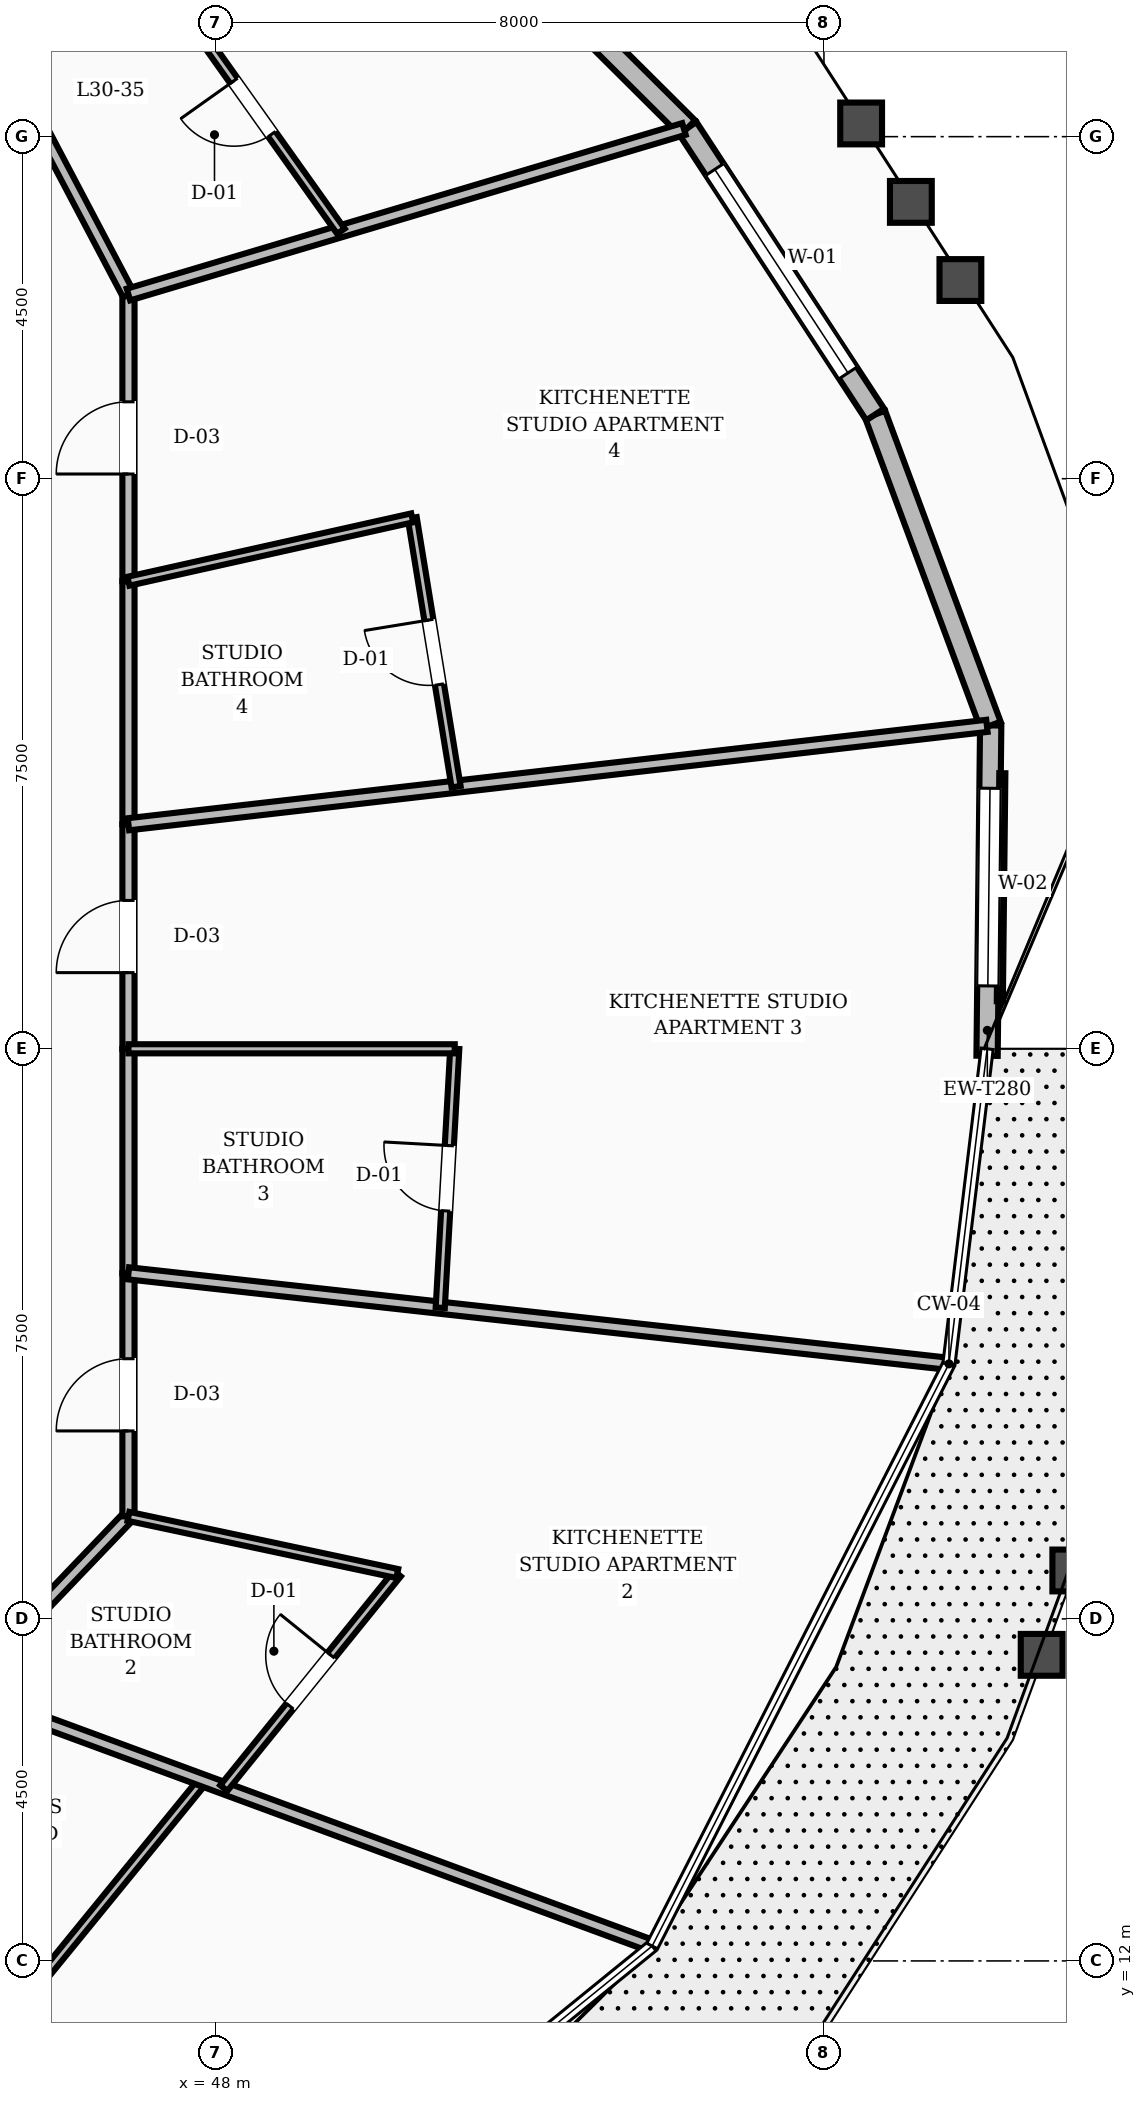
"""IFC4 building model, lengths in metres.
Left out: names, types, materials, properties, quantities, classifications, styles, units other than length and angle.
Written with IfcOpenShell. Run it as: python <this file> out.ifc"""

import sys

from ifc_helpers import new_model, si_unit, direction, frame, frame_2d, origin, place, context, subcontext, project, spatial, rectangle, extrude, element, fill, save


model = new_model("IFC4")
c1 = context("Model", 3, precision=1e-05, world=origin(), true_north=direction((0.0, 1.0)))
c2 = subcontext(c1, "Body", "Model", "MODEL_VIEW")
j1 = project(units=[si_unit("LENGTHUNIT", "METRE"), si_unit("PLANEANGLEUNIT", "RADIAN")], contexts=[c1])
p1 = place(None, origin())
s1 = spatial("IfcSite", under=j1, at=p1, CompositionType="ELEMENT")
p2 = place(p1, origin())
s2 = spatial("IfcBuilding", under=s1, at=p2, CompositionType="ELEMENT")
p3 = place(p2, frame((0.0, 0.0, 120.8)))
s3 = spatial("IfcBuildingStorey", under=s2, at=p3, CompositionType="ELEMENT", Elevation=120.8)
p4 = place(p3, frame((58.146, 23.908, 0.0), z_axis=(0.0, 0.0, 1.0), x_axis=(0.011008713298, 0.99993940228, 0.0)))
e1 = element("IfcWall", 1, at=p4, inside=s3, PredefinedType="STANDARD", context=c2, shape_type="SweptSolid", body=[
    extrude(rectangle(XDim=4.347, YDim=0.28, at=frame_2d((2.173, 0.0))), origin(), (0.0, 0.0, 1.0), 2.82),
])
p5 = place(p4, frame((0.919, 0.0, 0.8)))
e2 = element("IfcOpeningElement", 2, at=p5, cuts=e1, PredefinedType="OPENING", context=c2, shape_type="SweptSolid", body=[
    extrude(rectangle(XDim=2.6, YDim=1.65, at=frame_2d((1.3, 0.825))), frame((0.0, 0.15, 0.0), z_axis=(0.0, -1.0, 0.0), x_axis=(1.0, 0.0, 0.0)), (0.0, 0.0, 1.0), 0.3),
])
p6 = place(p3, frame((58.194, 28.254, 0.0), z_axis=(0.0, 0.0, 1.0), x_axis=(-0.348252546088, 0.937400748956, 0.0)))
e3 = element("IfcWall", 3, at=p6, inside=s3, PredefinedType="STANDARD", context=c2, shape_type="SweptSolid", body=[
    extrude(rectangle(XDim=4.364, YDim=0.28, at=frame_2d((2.182, 0.0))), origin(), (0.0, 0.0, 1.0), 2.82),
])
p7 = place(p3, frame((56.674, 32.345, 0.0), z_axis=(0.0, 0.0, 1.0), x_axis=(-0.547716413999, 0.836664048371, 0.0)))
e4 = element("IfcWall", 4, at=p7, inside=s3, PredefinedType="STANDARD", context=c2, shape_type="SweptSolid", body=[
    extrude(rectangle(XDim=4.506, YDim=0.28, at=frame_2d((2.253, 0.0))), origin(), (0.0, 0.0, 1.0), 2.82),
])
p8 = place(p7, frame((0.653, 0.0, 0.8)))
e5 = element("IfcOpeningElement", 5, at=p8, cuts=e4, PredefinedType="OPENING", context=c2, shape_type="SweptSolid", body=[
    extrude(rectangle(XDim=3.2, YDim=1.65, at=frame_2d((1.6, 0.825))), frame((0.0, 0.15, 0.0), z_axis=(0.0, -1.0, 0.0), x_axis=(1.0, 0.0, 0.0)), (0.0, 0.0, 1.0), 0.3),
])
p9 = place(p3, frame((54.206, 36.115, 0.0), z_axis=(0.0, 0.0, 1.0), x_axis=(-0.708876231206, 0.705332892208, 0.0)))
e6 = element("IfcWall", 6, at=p9, inside=s3, PredefinedType="STANDARD", context=c2, shape_type="SweptSolid", body=[
    extrude(rectangle(XDim=4.685, YDim=0.28, at=frame_2d((2.343, 0.0))), origin(), (0.0, 0.0, 1.0), 2.82),
])
p10 = place(p3, frame((46.85, 24.0, 0.0), z_axis=(0.0, 0.0, 1.0), x_axis=(0.0, 1.0, 0.0)))
e7 = element("IfcWall", 7, at=p10, inside=s3, PredefinedType="SOLIDWALL", context=c2, shape_type="SweptSolid", body=[
    extrude(rectangle(XDim=2.954, YDim=0.16, at=frame_2d((1.477, 0.0))), origin(), (0.0, 0.0, 1.0), 2.8),
])
p11 = place(p10, frame((1.002, 0.0, 0.0)))
e8 = element("IfcOpeningElement", 8, at=p11, cuts=e7, PredefinedType="OPENING", context=c2, shape_type="SweptSolid", body=[
    extrude(rectangle(XDim=0.95, YDim=2.1, at=frame_2d((0.475, 1.05))), frame((0.0, 0.09, 0.0), z_axis=(0.0, -1.0, 0.0), x_axis=(1.0, 0.0, 0.0)), (0.0, 0.0, 1.0), 0.18),
])
p12 = place(p3, frame((46.85, 26.954, 0.0), z_axis=(0.0, 0.0, 1.0), x_axis=(0.0, 1.0, 0.0)))
e9 = element("IfcWall", 9, at=p12, inside=s3, PredefinedType="SOLIDWALL", context=c2, shape_type="SweptSolid", body=[
    extrude(rectangle(XDim=3.197, YDim=0.16, at=frame_2d((1.599, 0.0))), origin(), (0.0, 0.0, 1.0), 2.8),
])
p13 = place(p3, frame((46.85, 30.151, 0.0), z_axis=(0.0, 0.0, 1.0), x_axis=(0.0, 1.0, 0.0)))
e10 = element("IfcWall", 10, at=p13, inside=s3, PredefinedType="SOLIDWALL", context=c2, shape_type="SweptSolid", body=[
    extrude(rectangle(XDim=3.771, YDim=0.16, at=frame_2d((1.886, 0.0))), origin(), (0.0, 0.0, 1.0), 2.8),
])
p14 = place(p13, frame((1.411, 0.0, 0.0)))
e11 = element("IfcOpeningElement", 11, at=p14, cuts=e10, PredefinedType="OPENING", context=c2, shape_type="SweptSolid", body=[
    extrude(rectangle(XDim=0.95, YDim=2.1, at=frame_2d((0.475, 1.05))), frame((0.0, 0.09, 0.0), z_axis=(0.0, -1.0, 0.0), x_axis=(1.0, 0.0, 0.0)), (0.0, 0.0, 1.0), 0.18),
])
p15 = place(p3, frame((46.85, 33.923, 0.0), z_axis=(0.0, 0.0, 1.0), x_axis=(-0.466093963429, 0.884735224378, 0.0)))
e12 = element("IfcWall", 12, at=p15, inside=s3, PredefinedType="SOLIDWALL", context=c2, shape_type="SweptSolid", body=[
    extrude(rectangle(XDim=3.648, YDim=0.16, at=frame_2d((1.824, 0.0))), origin(), (0.0, 0.0, 1.0), 2.8),
])
p16 = place(p3, frame((44.65, 15.548, 0.0), z_axis=(0.0, 0.0, 1.0), x_axis=(0.691055487108, 0.722801711216, 0.0)))
e13 = element("IfcWall", 13, at=p16, inside=s3, PredefinedType="SOLIDWALL", context=c2, shape_type="SweptSolid", body=[
    extrude(rectangle(XDim=3.184, YDim=0.16, at=frame_2d((1.592, 0.0))), origin(), (0.0, 0.0, 1.0), 2.8),
])
p17 = place(p3, frame((46.85, 17.849, 0.0), z_axis=(0.0, 0.0, 1.0), x_axis=(0.0, 1.0, 0.0)))
e14 = element("IfcWall", 14, at=p17, inside=s3, PredefinedType="SOLIDWALL", context=c2, shape_type="SweptSolid", body=[
    extrude(rectangle(XDim=3.197, YDim=0.16, at=frame_2d((1.599, 0.0))), origin(), (0.0, 0.0, 1.0), 2.8),
])
p18 = place(p17, frame((1.124, 0.0, 0.0)))
e15 = element("IfcOpeningElement", 15, at=p18, cuts=e14, PredefinedType="OPENING", context=c2, shape_type="SweptSolid", body=[
    extrude(rectangle(XDim=0.95, YDim=2.1, at=frame_2d((0.475, 1.05))), frame((0.0, 0.09, 0.0), z_axis=(0.0, -1.0, 0.0), x_axis=(1.0, 0.0, 0.0)), (0.0, 0.0, 1.0), 0.18),
])
p19 = place(p3, frame((46.85, 21.046, 0.0), z_axis=(0.0, 0.0, 1.0), x_axis=(0.0, 1.0, 0.0)))
e16 = element("IfcWall", 16, at=p19, inside=s3, PredefinedType="SOLIDWALL", context=c2, shape_type="SweptSolid", body=[
    extrude(rectangle(XDim=2.954, YDim=0.16, at=frame_2d((1.477, 0.0))), origin(), (0.0, 0.0, 1.0), 2.8),
])
p20 = place(p3, frame((45.588, 11.624, 0.0), z_axis=(0.0, 0.0, 1.0), x_axis=(0.632049552825, 0.774927972636, 0.0)))
e17 = element("IfcWall", 17, at=p20, inside=s3, PredefinedType="PARTITIONING", context=c2, shape_type="SweptSolid", body=[
    extrude(rectangle(XDim=3.549, YDim=0.12, at=frame_2d((1.774, 0.0))), origin(), (0.0, 0.0, 1.0), 2.8),
])
p21 = place(p3, frame((44.65, 15.548, 0.0), z_axis=(0.0, 0.0, 1.0), x_axis=(0.938256165997, -0.345941276764, 0.0)))
e18 = element("IfcWall", 18, at=p21, inside=s3, PredefinedType="SOLIDWALL", context=c2, shape_type="SweptSolid", body=[
    extrude(rectangle(XDim=9.639, YDim=0.16, at=frame_2d((4.819, 0.0))), origin(), (0.0, 0.0, 1.0), 2.8),
])
p22 = place(p3, frame((48.104, 14.274, 0.0), z_axis=(0.0, 0.0, 1.0), x_axis=(0.628681475745, 0.777662910299, 0.0)))
e19 = element("IfcWall", 19, at=p22, inside=s3, PredefinedType="PARTITIONING", context=c2, shape_type="SweptSolid", body=[
    extrude(rectangle(XDim=3.63, YDim=0.12, at=frame_2d((1.815, 0.0))), origin(), (0.0, 0.0, 1.0), 2.8),
])
p23 = place(p22, frame((1.385, 0.0, 0.0)))
e20 = element("IfcOpeningElement", 20, at=p23, cuts=e19, PredefinedType="OPENING", context=c2, shape_type="SweptSolid", body=[
    extrude(rectangle(XDim=0.86, YDim=2.1, at=frame_2d((0.43, 1.05))), frame((0.0, 0.07, 0.0), z_axis=(0.0, -1.0, 0.0), x_axis=(1.0, 0.0, 0.0)), (0.0, 0.0, 1.0), 0.14),
])
p24 = place(p3, frame((46.85, 17.849, 0.0), z_axis=(0.0, 0.0, 1.0), x_axis=(0.978118502474, -0.208048540292, 0.0)))
e21 = element("IfcWall", 21, at=p24, inside=s3, PredefinedType="PARTITIONING", context=c2, shape_type="SweptSolid", body=[
    extrude(rectangle(XDim=3.615, YDim=0.12, at=frame_2d((1.808, 0.0))), origin(), (0.0, 0.0, 1.0), 2.8),
])
p25 = place(p3, frame((46.85, 21.046, 0.0), z_axis=(0.0, 0.0, 1.0), x_axis=(0.993965535476, -0.109692817837, 0.0)))
e22 = element("IfcWall", 22, at=p25, inside=s3, PredefinedType="SOLIDWALL", context=c2, shape_type="SweptSolid", body=[
    extrude(rectangle(XDim=10.81, YDim=0.16, at=frame_2d((5.405, 0.0))), origin(), (0.0, 0.0, 1.0), 2.8),
])
p26 = place(p3, frame((50.952, 20.594, 0.0), z_axis=(0.0, 0.0, 1.0), x_axis=(0.055957480499, 0.998433152683, 0.0)))
e23 = element("IfcWall", 23, at=p26, inside=s3, PredefinedType="PARTITIONING", context=c2, shape_type="SweptSolid", body=[
    extrude(rectangle(XDim=3.412, YDim=0.12, at=frame_2d((1.706, 0.0))), origin(), (0.0, 0.0, 1.0), 2.8),
])
p27 = place(p26, frame((1.276, 0.0, 0.0)))
e24 = element("IfcOpeningElement", 24, at=p27, cuts=e23, PredefinedType="OPENING", context=c2, shape_type="SweptSolid", body=[
    extrude(rectangle(XDim=0.86, YDim=2.1, at=frame_2d((0.43, 1.05))), frame((0.0, 0.07, 0.0), z_axis=(0.0, -1.0, 0.0), x_axis=(1.0, 0.0, 0.0)), (0.0, 0.0, 1.0), 0.14),
])
p28 = place(p3, frame((46.85, 24.0, 0.0), z_axis=(0.0, 0.0, 1.0), x_axis=(1.0, 0.0, 0.0)))
e25 = element("IfcWall", 25, at=p28, inside=s3, PredefinedType="PARTITIONING", context=c2, shape_type="SweptSolid", body=[
    extrude(rectangle(XDim=4.293, YDim=0.12, at=frame_2d((2.146, 0.0))), origin(), (0.0, 0.0, 1.0), 2.8),
])
p29 = place(p3, frame((46.85, 26.954, 0.0), z_axis=(0.0, 0.0, 1.0), x_axis=(0.993493502976, 0.113888803422, 0.0)))
e26 = element("IfcWall", 26, at=p29, inside=s3, PredefinedType="SOLIDWALL", context=c2, shape_type="SweptSolid", body=[
    extrude(rectangle(XDim=11.368, YDim=0.16, at=frame_2d((5.684, 0.0))), origin(), (0.0, 0.0, 1.0), 2.8),
])
p30 = place(p3, frame((51.161, 27.448, 0.0), z_axis=(0.0, 0.0, 1.0), x_axis=(-0.161117002458, 0.986935312733, 0.0)))
e27 = element("IfcWall", 27, at=p30, inside=s3, PredefinedType="PARTITIONING", context=c2, shape_type="SweptSolid", body=[
    extrude(rectangle(XDim=3.584, YDim=0.12, at=frame_2d((1.792, 0.0))), origin(), (0.0, 0.0, 1.0), 2.8),
])
p31 = place(p30, frame((1.362, 0.0, 0.0)))
e28 = element("IfcOpeningElement", 28, at=p31, cuts=e27, PredefinedType="OPENING", context=c2, shape_type="SweptSolid", body=[
    extrude(rectangle(XDim=0.86, YDim=2.1, at=frame_2d((0.43, 1.05))), frame((0.0, 0.07, 0.0), z_axis=(0.0, -1.0, 0.0), x_axis=(1.0, 0.0, 0.0)), (0.0, 0.0, 1.0), 0.14),
])
p32 = place(p3, frame((46.85, 30.151, 0.0), z_axis=(0.0, 0.0, 1.0), x_axis=(0.975956740553, 0.217964310312, 0.0)))
e29 = element("IfcWall", 29, at=p32, inside=s3, PredefinedType="PARTITIONING", context=c2, shape_type="SweptSolid", body=[
    extrude(rectangle(XDim=3.825, YDim=0.12, at=frame_2d((1.913, 0.0))), origin(), (0.0, 0.0, 1.0), 2.8),
])
p33 = place(p3, frame((46.85, 33.923, 0.0), z_axis=(0.0, 0.0, 1.0), x_axis=(0.958328823474, 0.285667404685, 0.0)))
e30 = element("IfcWall", 30, at=p33, inside=s3, PredefinedType="SOLIDWALL", context=c2, shape_type="SweptSolid", body=[
    extrude(rectangle(XDim=7.626, YDim=0.16, at=frame_2d((3.813, 0.0))), origin(), (0.0, 0.0, 1.0), 2.8),
])
p34 = place(p3, frame((49.645, 34.756, 0.0), z_axis=(0.0, 0.0, 1.0), x_axis=(-0.579584195977, 0.814912363248, 0.0)))
e31 = element("IfcWall", 31, at=p34, inside=s3, PredefinedType="PARTITIONING", context=c2, shape_type="SweptSolid", body=[
    extrude(rectangle(XDim=3.996, YDim=0.12, at=frame_2d((1.998, 0.0))), origin(), (0.0, 0.0, 1.0), 2.8),
])
p35 = place(p34, frame((1.568, 0.0, 0.0)))
e32 = element("IfcOpeningElement", 32, at=p35, cuts=e31, PredefinedType="OPENING", context=c2, shape_type="SweptSolid", body=[
    extrude(rectangle(XDim=0.86, YDim=2.1, at=frame_2d((0.43, 1.05))), frame((0.0, 0.07, 0.0), z_axis=(0.0, -1.0, 0.0), x_axis=(1.0, 0.0, 0.0)), (0.0, 0.0, 1.0), 0.14),
])
p36 = place(p3, frame((45.15, 37.15, 0.0), z_axis=(0.0, 0.0, 1.0), x_axis=(0.929814039577, 0.368029688755, 0.0)))
e33 = element("IfcWall", 33, at=p36, inside=s3, PredefinedType="PARTITIONING", context=c2, shape_type="SweptSolid", body=[
    extrude(rectangle(XDim=2.344, YDim=0.12, at=frame_2d((1.172, 0.0))), origin(), (0.0, 0.0, 1.0), 2.8),
])
p37 = place(p5, origin())
e34 = element("IfcWindow", 34, at=p37, inside=s3, PartitioningType="SINGLE_PANEL", PredefinedType="WINDOW", context=c2, shape_type="SweptSolid", body=[
    extrude(rectangle(XDim=2.6, YDim=1.65, at=frame_2d((1.3, 0.825))), frame((0.0, 0.03, 0.0), z_axis=(0.0, -1.0, 0.0), x_axis=(1.0, 0.0, 0.0)), (0.0, 0.0, 1.0), 0.06),
])
fill(e2, e34)
p38 = place(p8, origin())
e35 = element("IfcWindow", 35, at=p38, inside=s3, PartitioningType="SINGLE_PANEL", PredefinedType="WINDOW", context=c2, shape_type="SweptSolid", body=[
    extrude(rectangle(XDim=3.2, YDim=1.65, at=frame_2d((1.6, 0.825))), frame((0.0, 0.03, 0.0), z_axis=(0.0, -1.0, 0.0), x_axis=(1.0, 0.0, 0.0)), (0.0, 0.0, 1.0), 0.06),
])
fill(e5, e35)
p39 = place(p23, origin())
e36 = element("IfcDoor", 36, at=p39, inside=s3, OperationType="SINGLE_SWING_RIGHT", PredefinedType="DOOR", context=c2, shape_type="SweptSolid", body=[
    extrude(rectangle(XDim=0.86, YDim=2.1, at=frame_2d((0.43, 1.05))), frame((0.0, 0.025, 0.0), z_axis=(0.0, -1.0, 0.0), x_axis=(1.0, 0.0, 0.0)), (0.0, 0.0, 1.0), 0.05),
])
fill(e20, e36)
p40 = place(p18, origin())
e37 = element("IfcDoor", 37, at=p40, inside=s3, OperationType="SINGLE_SWING_LEFT", PredefinedType="DOOR", context=c2, shape_type="SweptSolid", body=[
    extrude(rectangle(XDim=0.95, YDim=2.1, at=frame_2d((0.475, 1.05))), frame((0.0, 0.025, 0.0), z_axis=(0.0, -1.0, 0.0), x_axis=(1.0, 0.0, 0.0)), (0.0, 0.0, 1.0), 0.05),
])
fill(e15, e37)
p41 = place(p27, origin())
e38 = element("IfcDoor", 38, at=p41, inside=s3, OperationType="SINGLE_SWING_RIGHT", PredefinedType="DOOR", context=c2, shape_type="SweptSolid", body=[
    extrude(rectangle(XDim=0.86, YDim=2.1, at=frame_2d((0.43, 1.05))), frame((0.0, 0.025, 0.0), z_axis=(0.0, -1.0, 0.0), x_axis=(1.0, 0.0, 0.0)), (0.0, 0.0, 1.0), 0.05),
])
fill(e24, e38)
p42 = place(p11, origin())
e39 = element("IfcDoor", 39, at=p42, inside=s3, OperationType="SINGLE_SWING_LEFT", PredefinedType="DOOR", context=c2, shape_type="SweptSolid", body=[
    extrude(rectangle(XDim=0.95, YDim=2.1, at=frame_2d((0.475, 1.05))), frame((0.0, 0.025, 0.0), z_axis=(0.0, -1.0, 0.0), x_axis=(1.0, 0.0, 0.0)), (0.0, 0.0, 1.0), 0.05),
])
fill(e8, e39)
p43 = place(p31, origin())
e40 = element("IfcDoor", 40, at=p43, inside=s3, OperationType="SINGLE_SWING_RIGHT", PredefinedType="DOOR", context=c2, shape_type="SweptSolid", body=[
    extrude(rectangle(XDim=0.86, YDim=2.1, at=frame_2d((0.43, 1.05))), frame((0.0, 0.025, 0.0), z_axis=(0.0, -1.0, 0.0), x_axis=(1.0, 0.0, 0.0)), (0.0, 0.0, 1.0), 0.05),
])
fill(e28, e40)
p44 = place(p14, origin())
e41 = element("IfcDoor", 41, at=p44, inside=s3, OperationType="SINGLE_SWING_LEFT", PredefinedType="DOOR", context=c2, shape_type="SweptSolid", body=[
    extrude(rectangle(XDim=0.95, YDim=2.1, at=frame_2d((0.475, 1.05))), frame((0.0, 0.025, 0.0), z_axis=(0.0, -1.0, 0.0), x_axis=(1.0, 0.0, 0.0)), (0.0, 0.0, 1.0), 0.05),
])
fill(e11, e41)
p45 = place(p35, origin())
e42 = element("IfcDoor", 42, at=p45, inside=s3, OperationType="SINGLE_SWING_RIGHT", PredefinedType="DOOR", context=c2, shape_type="SweptSolid", body=[
    extrude(rectangle(XDim=0.86, YDim=2.1, at=frame_2d((0.43, 1.05))), frame((0.0, 0.025, 0.0), z_axis=(0.0, -1.0, 0.0), x_axis=(1.0, 0.0, 0.0)), (0.0, 0.0, 1.0), 0.05),
])
fill(e32, e42)
save(model, sys.argv[1])
